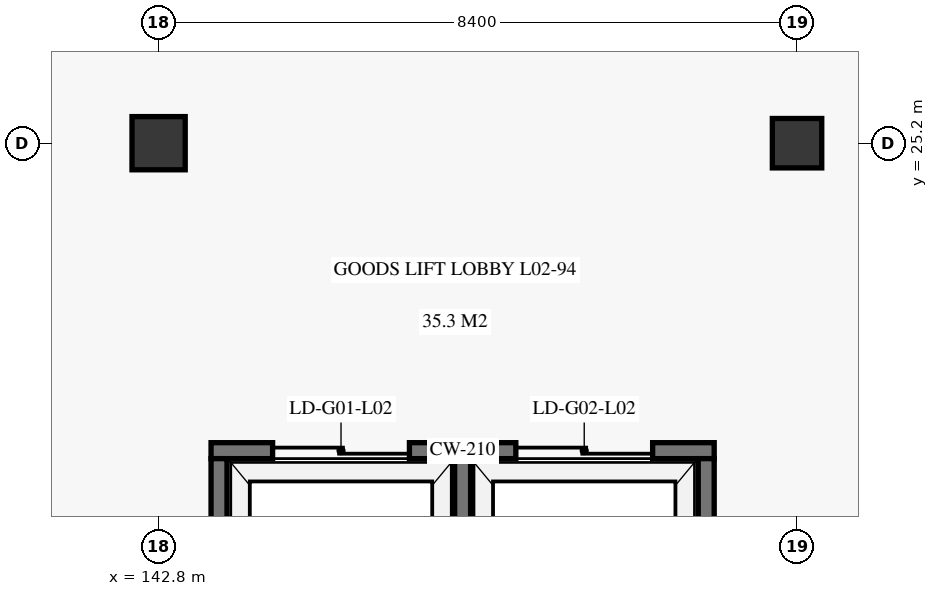
"""IFC4 building model, lengths in metres.
Left out: names, types, materials, properties, quantities, classifications, styles, units other than length and angle.
Written with IfcOpenShell. Run it as: python <this file> out.ifc"""

import sys

from ifc_helpers import new_model, si_unit, direction, frame, frame_2d, origin, origin_2d, place, context, subcontext, project, spatial, rectangle, extrude, element, fill, save


model = new_model("IFC4")
c1 = context("Model", 3, precision=1e-05, world=origin(), true_north=direction((0.0, 1.0)))
c2 = subcontext(c1, "Body", "Model", "MODEL_VIEW")
j1 = project(units=[si_unit("LENGTHUNIT", "METRE"), si_unit("PLANEANGLEUNIT", "RADIAN")], contexts=[c1])
p1 = place(None, origin())
s1 = spatial("IfcSite", under=j1, at=p1, CompositionType="ELEMENT")
p2 = place(p1, origin())
s2 = spatial("IfcBuilding", under=s1, at=p2, CompositionType="ELEMENT")
p3 = place(p2, frame((0.0, 0.0, 6.0)))
s3 = spatial("IfcBuildingStorey", under=s2, at=p3, CompositionType="ELEMENT", Elevation=6.0)
p4 = place(p3, frame((142.8, 25.2, 0.0), z_axis=(0.0, 0.0, 1.0), x_axis=(1.0, 0.0, 0.0)))
e1 = element("IfcColumn", 1, at=p4, inside=s3, PredefinedType="COLUMN", context=c2, shape_type="SweptSolid", body=[
    extrude(rectangle(XDim=0.7, YDim=0.7, at=origin_2d()), origin(), (0.0, 0.0, 1.0), 5.1),
])
p5 = place(p3, frame((151.2, 25.2, 0.0), z_axis=(0.0, 0.0, 1.0), x_axis=(1.0, 0.0, 0.0)))
e2 = element("IfcColumn", 2, at=p5, inside=s3, PredefinedType="COLUMN", context=c2, shape_type="SweptSolid", body=[
    extrude(rectangle(XDim=0.65, YDim=0.65, at=origin_2d()), origin(), (0.0, 0.0, 1.0), 5.1),
])
p6 = place(p3, frame((143.49, 21.155, 0.0), z_axis=(0.0, 0.0, 1.0), x_axis=(1.0, 0.0, 0.0)))
e3 = element("IfcWall", 3, at=p6, inside=s3, PredefinedType="SHEAR", context=c2, shape_type="SweptSolid", body=[
    extrude(rectangle(XDim=6.62, YDim=0.21, at=frame_2d((3.31, 0.0))), origin(), (0.0, 0.0, 1.0), 5.1),
])
p7 = place(p6, frame((0.81, 0.0, 0.0)))
e4 = element("IfcOpeningElement", 4, at=p7, cuts=e3, PredefinedType="OPENING", context=c2, shape_type="SweptSolid", body=[
    extrude(rectangle(XDim=1.8, YDim=2.45, at=frame_2d((0.9, 1.225))), frame((0.0, 0.115, 0.0), z_axis=(0.0, -1.0, 0.0), x_axis=(1.0, 0.0, 0.0)), (0.0, 0.0, 1.0), 0.23),
])
p8 = place(p6, frame((4.01, 0.0, 0.0)))
e5 = element("IfcOpeningElement", 5, at=p8, cuts=e3, PredefinedType="OPENING", context=c2, shape_type="SweptSolid", body=[
    extrude(rectangle(XDim=1.8, YDim=2.45, at=frame_2d((0.9, 1.225))), frame((0.0, 0.115, 0.0), z_axis=(0.0, -1.0, 0.0), x_axis=(1.0, 0.0, 0.0)), (0.0, 0.0, 1.0), 0.23),
])
for number, where, z_axis, x_axis in (
    (6, (143.595, 17.45, 0.0), (0.0, 0.0, 1.0), (0.0, 1.0, 0.0)),
    (7, (150.005, 17.45, 0.0), (0.0, 0.0, 1.0), (0.0, 1.0, 0.0)),
    (8, (146.8, 17.45, 0.0), (0.0, 0.0, 1.0), (0.0, 1.0, 0.0)),
):
    element("IfcWall", number, at=place(p3, frame(where, z_axis=z_axis, x_axis=x_axis)), inside=s3, PredefinedType="SHEAR", context=c2, shape_type="SweptSolid", body=[
        extrude(rectangle(XDim=3.6, YDim=0.21, at=frame_2d((1.8, 0.0))), origin(), (0.0, 0.0, 1.0), 5.1),
    ])
p9 = place(p7, origin())
e9 = element("IfcDoor", 9, at=p9, inside=s3, OperationType="DOUBLE_DOOR_SLIDING", PredefinedType="DOOR", context=c2, shape_type="SweptSolid", body=[
    extrude(rectangle(XDim=1.8, YDim=2.45, at=frame_2d((0.9, 1.225))), frame((0.0, 0.025, 0.0), z_axis=(0.0, -1.0, 0.0), x_axis=(1.0, 0.0, 0.0)), (0.0, 0.0, 1.0), 0.05),
])
fill(e4, e9)
p10 = place(p8, origin())
e10 = element("IfcDoor", 10, at=p10, inside=s3, OperationType="DOUBLE_DOOR_SLIDING", PredefinedType="DOOR", context=c2, shape_type="SweptSolid", body=[
    extrude(rectangle(XDim=1.8, YDim=2.45, at=frame_2d((0.9, 1.225))), frame((0.0, 0.025, 0.0), z_axis=(0.0, -1.0, 0.0), x_axis=(1.0, 0.0, 0.0)), (0.0, 0.0, 1.0), 0.05),
])
fill(e5, e10)
save(model, sys.argv[1])
